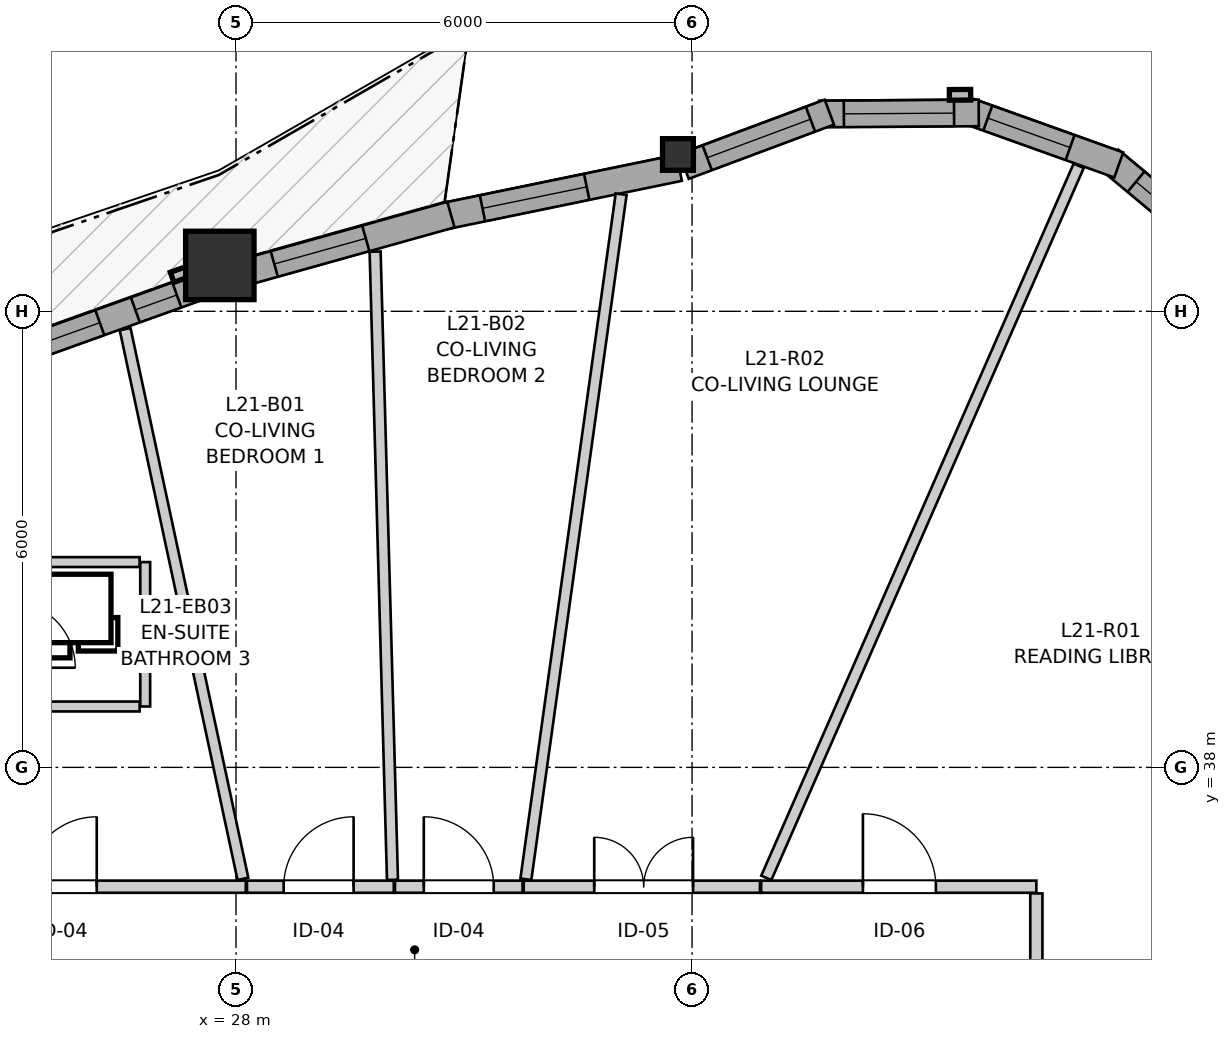
"""IFC4 building model, lengths in metres.
Left out: names, types, materials, properties, quantities, classifications, styles, units other than length and angle.
Written with IfcOpenShell. Run it as: python <this file> out.ifc"""

import sys

from ifc_helpers import new_model, si_unit, direction, frame, frame_2d, origin, origin_2d, place, context, subcontext, project, spatial, rectangle, i_section, extrude, source, transform, mapped, element, fill, save


model = new_model("IFC4")
c1 = context("Model", 3, precision=1e-05, world=origin(), true_north=direction((0.0, 1.0)))
c2 = subcontext(c1, "Body", "Model", "MODEL_VIEW")
j1 = project(units=[si_unit("LENGTHUNIT", "METRE"), si_unit("PLANEANGLEUNIT", "RADIAN")], contexts=[c1])
p1 = place(None, origin())
s1 = spatial("IfcSite", under=j1, at=p1, CompositionType="ELEMENT")
p2 = place(p1, origin())
s2 = spatial("IfcBuilding", under=s1, at=p2, CompositionType="ELEMENT")
p3 = place(p2, frame((0.0, 0.0, 73.6)))
s3 = spatial("IfcBuildingStorey", under=s2, at=p3, CompositionType="ELEMENT", Elevation=73.6)
m1 = source(origin(), c2, "Body", "SweptSolid", [
    extrude(i_section(OverallWidth=0.406, OverallDepth=0.416, WebThickness=0.027, FlangeThickness=0.044, FilletRadius=0.015, at=origin_2d()), origin(), (0.0, 0.0, 1.0), 2.95),
])
p4 = place(p3, frame((33.815, 46.063, 0.0), z_axis=(0.0, 0.0, 1.0), x_axis=(1.0, 0.0, 0.0)))
e1 = element("IfcColumn", 1, at=p4, inside=s3, PredefinedType="PILASTER", context=c2, shape_type="MappedRepresentation", body=[
    mapped(m1, transform((0.0, 0.0, 0.0), x_axis=(1.0, 0.0, 0.0), y_axis=(0.0, 1.0, 0.0), z_axis=(0.0, 0.0, 1.0), scale=1.0)),
])
m2 = source(origin(), c2, "Body", "SweptSolid", [
    extrude(rectangle(XDim=0.9, YDim=0.9, at=origin_2d()), origin(), (0.0, 0.0, 1.0), 2.95),
])
p5 = place(p3, frame((27.787, 44.604, 0.0), z_axis=(0.0, 0.0, 1.0), x_axis=(1.0, 0.0, 0.0)))
e2 = element("IfcColumn", 2, at=p5, inside=s3, PredefinedType="COLUMN", context=c2, shape_type="MappedRepresentation", body=[
    mapped(m2, transform((0.0, 0.0, 0.0), x_axis=(1.0, 0.0, 0.0), y_axis=(0.0, 1.0, 0.0), z_axis=(0.0, 0.0, 1.0), scale=1.0)),
])
p6 = place(p3, frame((41.109, 44.65, 0.0), z_axis=(0.0, 0.0, 1.0), x_axis=(-0.768450068703, 0.639909752942, 0.0)))
e3 = element("IfcWall", 3, at=p6, inside=s3, PredefinedType="SOLIDWALL", context=c2, shape_type="SweptSolid", body=[
    extrude(rectangle(XDim=2.099, YDim=0.35, at=frame_2d((1.049, 0.0))), origin(), (0.0, 0.0, 1.0), 2.48),
])
p7 = place(p6, frame((0.449, 0.0, 0.82)))
e4 = element("IfcOpeningElement", 4, at=p7, cuts=e3, PredefinedType="OPENING", context=c2, shape_type="SweptSolid", body=[
    extrude(rectangle(XDim=1.2, YDim=1.45, at=frame_2d((0.6, 0.725))), frame((0.0, 0.185, 0.0), z_axis=(0.0, -1.0, 0.0), x_axis=(1.0, 0.0, 0.0)), (0.0, 0.0, 1.0), 0.37),
])
p8 = place(p3, frame((39.614, 45.925, 0.0), z_axis=(0.0, 0.0, 1.0), x_axis=(-0.941486401639, 0.33705096874, 0.0)))
e5 = element("IfcWall", 5, at=p8, inside=s3, PredefinedType="SOLIDWALL", context=c2, shape_type="SweptSolid", body=[
    extrude(rectangle(XDim=2.099, YDim=0.35, at=frame_2d((1.05, 0.0))), origin(), (0.0, 0.0, 1.0), 2.48),
])
p9 = place(p8, frame((0.68, 0.0, 0.82)))
e6 = element("IfcOpeningElement", 6, at=p9, cuts=e5, PredefinedType="OPENING", context=c2, shape_type="SweptSolid", body=[
    extrude(rectangle(XDim=1.15, YDim=1.2, at=frame_2d((0.575, 0.6))), frame((0.0, 0.185, 0.0), z_axis=(0.0, -1.0, 0.0), x_axis=(1.0, 0.0, 0.0)), (0.0, 0.0, 1.0), 0.37),
])
p10 = place(p3, frame((37.772, 46.61, 0.0), z_axis=(0.0, 0.0, 1.0), x_axis=(-0.999976451414, -0.006862697526, 0.0)))
e7 = element("IfcWall", 7, at=p10, inside=s3, PredefinedType="SOLIDWALL", context=c2, shape_type="SweptSolid", body=[
    extrude(rectangle(XDim=2.099, YDim=0.35, at=frame_2d((1.049, 0.0))), origin(), (0.0, 0.0, 1.0), 2.48),
])
p11 = place(p10, frame((0.324, 0.0, 0.82)))
e8 = element("IfcOpeningElement", 8, at=p11, cuts=e7, PredefinedType="OPENING", context=c2, shape_type="SweptSolid", body=[
    extrude(rectangle(XDim=1.45, YDim=1.25, at=frame_2d((0.725, 0.625))), frame((0.0, 0.185, 0.0), z_axis=(0.0, -1.0, 0.0), x_axis=(1.0, 0.0, 0.0)), (0.0, 0.0, 1.0), 0.37),
])
p12 = place(p3, frame((35.806, 46.62, 0.0), z_axis=(0.0, 0.0, 1.0), x_axis=(-0.936863987578, -0.34969396446, 0.0)))
e9 = element("IfcWall", 9, at=p12, inside=s3, PredefinedType="SOLIDWALL", context=c2, shape_type="SweptSolid", body=[
    extrude(rectangle(XDim=2.041, YDim=0.35, at=frame_2d((1.021, 0.0))), origin(), (0.0, 0.0, 1.0), 2.48),
])
p13 = place(p12, frame((0.265, 0.0, 0.82)))
e10 = element("IfcOpeningElement", 10, at=p13, cuts=e9, PredefinedType="OPENING", context=c2, shape_type="SweptSolid", body=[
    extrude(rectangle(XDim=1.45, YDim=1.25, at=frame_2d((0.725, 0.625))), frame((0.0, 0.185, 0.0), z_axis=(0.0, -1.0, 0.0), x_axis=(1.0, 0.0, 0.0)), (0.0, 0.0, 1.0), 0.37),
])
p14 = place(p3, frame((33.83, 45.888, 0.0), z_axis=(0.0, 0.0, 1.0), x_axis=(-0.979439051097, -0.201740291429, 0.0)))
e11 = element("IfcWall", 11, at=p14, inside=s3, PredefinedType="SOLIDWALL", context=c2, shape_type="SweptSolid", body=[
    extrude(rectangle(XDim=3.154, YDim=0.35, at=frame_2d((1.577, 0.0))), origin(), (0.0, 0.0, 1.0), 2.48),
])
p15 = place(p14, frame((1.242, 0.0, 0.82)))
e12 = element("IfcOpeningElement", 12, at=p15, cuts=e11, PredefinedType="OPENING", context=c2, shape_type="SweptSolid", body=[
    extrude(rectangle(XDim=1.4, YDim=1.35, at=frame_2d((0.7, 0.675))), frame((0.0, 0.185, 0.0), z_axis=(0.0, -1.0, 0.0), x_axis=(1.0, 0.0, 0.0)), (0.0, 0.0, 1.0), 0.37),
])
p16 = place(p3, frame((30.827, 45.272, 0.0), z_axis=(0.0, 0.0, 1.0), x_axis=(-0.963061576901, -0.269281263918, 0.0)))
e13 = element("IfcWall", 13, at=p16, inside=s3, PredefinedType="SOLIDWALL", context=c2, shape_type="SweptSolid", body=[
    extrude(rectangle(XDim=2.883, YDim=0.35, at=frame_2d((1.441, 0.0))), origin(), (0.0, 0.0, 1.0), 2.48),
])
p17 = place(p16, frame((1.163, 0.0, 0.82)))
e14 = element("IfcOpeningElement", 14, at=p17, cuts=e13, PredefinedType="OPENING", context=c2, shape_type="SweptSolid", body=[
    extrude(rectangle(XDim=1.25, YDim=1.35, at=frame_2d((0.625, 0.675))), frame((0.0, 0.185, 0.0), z_axis=(0.0, -1.0, 0.0), x_axis=(1.0, 0.0, 0.0)), (0.0, 0.0, 1.0), 0.37),
])
p18 = place(p3, frame((27.634, 44.363, 0.0), z_axis=(0.0, 0.0, 1.0), x_axis=(-0.941122275829, -0.3380663573, 0.0)))
e15 = element("IfcWall", 15, at=p18, inside=s3, PredefinedType="SOLIDWALL", context=c2, shape_type="SweptSolid", body=[
    extrude(rectangle(XDim=2.833, YDim=0.35, at=frame_2d((1.417, 0.0))), origin(), (0.0, 0.0, 1.0), 2.48),
])
p19 = place(p18, frame((0.439, 0.0, 0.82)))
e16 = element("IfcOpeningElement", 16, at=p19, cuts=e15, PredefinedType="OPENING", context=c2, shape_type="SweptSolid", body=[
    extrude(rectangle(XDim=0.58, YDim=1.35, at=frame_2d((0.29, 0.675))), frame((0.0, 0.185, 0.0), z_axis=(0.0, -1.0, 0.0), x_axis=(1.0, 0.0, 0.0)), (0.0, 0.0, 1.0), 0.37),
])
p20 = place(p18, frame((1.515, 0.0, 0.82)))
e17 = element("IfcOpeningElement", 17, at=p20, cuts=e15, PredefinedType="OPENING", context=c2, shape_type="SweptSolid", body=[
    extrude(rectangle(XDim=0.95, YDim=1.35, at=frame_2d((0.475, 0.675))), frame((0.0, 0.185, 0.0), z_axis=(0.0, -1.0, 0.0), x_axis=(1.0, 0.0, 0.0)), (0.0, 0.0, 1.0), 0.37),
])
p21 = place(p3, frame((23.284, 36.43, 0.0), z_axis=(0.0, 0.0, 1.0), x_axis=(1.0, 0.0, 0.0)))
e18 = element("IfcWall", 18, at=p21, inside=s3, PredefinedType="PARTITIONING", context=c2, shape_type="SweptSolid", body=[
    extrude(rectangle(XDim=4.845, YDim=0.16, at=frame_2d((2.422, 0.0))), origin(), (0.0, 0.0, 1.0), 2.588),
])
p22 = place(p21, frame((1.963, 0.0, 0.0)))
e19 = element("IfcOpeningElement", 19, at=p22, cuts=e18, PredefinedType="OPENING", context=c2, shape_type="SweptSolid", body=[
    extrude(rectangle(XDim=0.92, YDim=2.1, at=frame_2d((0.46, 1.05))), frame((0.0, 0.09, 0.0), z_axis=(0.0, -1.0, 0.0), x_axis=(1.0, 0.0, 0.0)), (0.0, 0.0, 1.0), 0.18),
])
p23 = place(p3, frame((34.909, 36.43, 0.0), z_axis=(0.0, 0.0, 1.0), x_axis=(1.0, 0.0, 0.0)))
e20 = element("IfcWall", 20, at=p23, inside=s3, PredefinedType="PARTITIONING", context=c2, shape_type="SweptSolid", body=[
    extrude(rectangle(XDim=3.621, YDim=0.16, at=frame_2d((1.811, 0.0))), origin(), (0.0, 0.0, 1.0), 2.588),
])
p24 = place(p23, frame((1.339, 0.0, 0.0)))
e21 = element("IfcOpeningElement", 21, at=p24, cuts=e20, PredefinedType="OPENING", context=c2, shape_type="SweptSolid", body=[
    extrude(rectangle(XDim=0.96, YDim=2.1, at=frame_2d((0.48, 1.05))), frame((0.0, 0.09, 0.0), z_axis=(0.0, -1.0, 0.0), x_axis=(1.0, 0.0, 0.0)), (0.0, 0.0, 1.0), 0.18),
])
p25 = place(p3, frame((31.785, 36.43, 0.0), z_axis=(0.0, 0.0, 1.0), x_axis=(1.0, 0.0, 0.0)))
e22 = element("IfcWall", 22, at=p25, inside=s3, PredefinedType="PARTITIONING", context=c2, shape_type="SweptSolid", body=[
    extrude(rectangle(XDim=3.109, YDim=0.16, at=frame_2d((1.555, 0.0))), origin(), (0.0, 0.0, 1.0), 2.95),
])
p26 = place(p25, frame((0.928, 0.0, 0.0)))
e23 = element("IfcOpeningElement", 23, at=p26, cuts=e22, PredefinedType="OPENING", context=c2, shape_type="SweptSolid", body=[
    extrude(rectangle(XDim=1.3, YDim=2.1, at=frame_2d((0.65, 1.05))), frame((0.0, 0.09, 0.0), z_axis=(0.0, -1.0, 0.0), x_axis=(1.0, 0.0, 0.0)), (0.0, 0.0, 1.0), 0.18),
])
p27 = place(p3, frame((28.144, 36.43, 0.0), z_axis=(0.0, 0.0, 1.0), x_axis=(1.0, 0.0, 0.0)))
e24 = element("IfcWall", 24, at=p27, inside=s3, PredefinedType="PARTITIONING", context=c2, shape_type="SweptSolid", body=[
    extrude(rectangle(XDim=1.932, YDim=0.16, at=frame_2d((0.966, 0.0))), origin(), (0.0, 0.0, 1.0), 2.95),
])
p28 = place(p27, frame((0.483, 0.0, 0.0)))
e25 = element("IfcOpeningElement", 25, at=p28, cuts=e24, PredefinedType="OPENING", context=c2, shape_type="SweptSolid", body=[
    extrude(rectangle(XDim=0.92, YDim=2.1, at=frame_2d((0.46, 1.05))), frame((0.0, 0.09, 0.0), z_axis=(0.0, -1.0, 0.0), x_axis=(1.0, 0.0, 0.0)), (0.0, 0.0, 1.0), 0.18),
])
p29 = place(p3, frame((30.091, 36.43, 0.0), z_axis=(0.0, 0.0, 1.0), x_axis=(1.0, 0.0, 0.0)))
e26 = element("IfcWall", 26, at=p29, inside=s3, PredefinedType="PARTITIONING", context=c2, shape_type="SweptSolid", body=[
    extrude(rectangle(XDim=1.679, YDim=0.16, at=frame_2d((0.839, 0.0))), origin(), (0.0, 0.0, 1.0), 2.95),
])
p30 = place(p29, frame((0.379, 0.0, 0.0)))
e27 = element("IfcOpeningElement", 27, at=p30, cuts=e26, PredefinedType="OPENING", context=c2, shape_type="SweptSolid", body=[
    extrude(rectangle(XDim=0.92, YDim=2.1, at=frame_2d((0.46, 1.05))), frame((0.0, 0.09, 0.0), z_axis=(0.0, -1.0, 0.0), x_axis=(1.0, 0.0, 0.0)), (0.0, 0.0, 1.0), 0.18),
])
p31 = place(p3, frame((34.977, 36.546, 0.0), z_axis=(0.0, 0.0, 1.0), x_axis=(0.40175384449, 0.915747699117, 0.0)))
e28 = element("IfcWall", 28, at=p31, inside=s3, PredefinedType="PARTITIONING", context=c2, shape_type="SweptSolid", body=[
    extrude(rectangle(XDim=10.23, YDim=0.145, at=frame_2d((5.115, 0.0))), origin(), (0.0, 0.0, 1.0), 2.95),
])
p32 = place(p3, frame((31.814, 36.528, 0.0), z_axis=(0.0, 0.0, 1.0), x_axis=(0.137724115974, 0.990470629488, 0.0)))
e29 = element("IfcWall", 29, at=p32, inside=s3, PredefinedType="PARTITIONING", context=c2, shape_type="SweptSolid", body=[
    extrude(rectangle(XDim=9.099, YDim=0.145, at=frame_2d((4.55, 0.0))), origin(), (0.0, 0.0, 1.0), 2.95),
])
p33 = place(p3, frame((29.83, 44.785, 0.0), z_axis=(0.0, 0.0, 1.0), x_axis=(0.027636759054, -0.999618031825, 0.0)))
e30 = element("IfcWall", 30, at=p33, inside=s3, PredefinedType="PARTITIONING", context=c2, shape_type="SweptSolid", body=[
    extrude(rectangle(XDim=8.269, YDim=0.145, at=frame_2d((4.134, 0.0))), origin(), (0.0, 0.0, 1.0), 2.95),
])
p34 = place(p3, frame((26.541, 43.766, 0.0), z_axis=(0.0, 0.0, 1.0), x_axis=(0.209522326513, -0.9778038631, 0.0)))
e31 = element("IfcWall", 31, at=p34, inside=s3, PredefinedType="PARTITIONING", context=c2, shape_type="SweptSolid", body=[
    extrude(rectangle(XDim=7.397, YDim=0.145, at=frame_2d((3.698, 0.0))), origin(), (0.0, 0.0, 1.0), 2.95),
])
p35 = place(p3, frame((38.665, 33.63, 0.0), z_axis=(0.0, 0.0, 1.0), x_axis=(0.736824900837, 0.676083623161, 0.0)))
e32 = element("IfcWall", 32, at=p35, inside=s3, PredefinedType="PARTITIONING", context=c2, shape_type="SweptSolid", body=[
    extrude(rectangle(XDim=6.25, YDim=0.145, at=frame_2d((3.125, 0.0))), origin(), (0.0, 0.0, 1.0), 2.95),
])
p36 = place(p3, frame((38.53, 33.721, 0.0), z_axis=(0.0, 0.0, 1.0), x_axis=(0.0, 1.0, 0.0)))
e33 = element("IfcWall", 33, at=p36, inside=s3, PredefinedType="PARTITIONING", context=c2, shape_type="SweptSolid", body=[
    extrude(rectangle(XDim=2.621, YDim=0.16, at=frame_2d((1.311, 0.0))), origin(), (0.0, 0.0, 1.0), 2.588),
])
p37 = place(p3, frame((26.805, 38.801, 0.0), z_axis=(0.0, 0.0, 1.0), x_axis=(0.0, 1.0, 0.0)))
e34 = element("IfcWall", 34, at=p37, inside=s3, PredefinedType="PARTITIONING", context=c2, shape_type="SweptSolid", body=[
    extrude(rectangle(XDim=1.9, YDim=0.13, at=frame_2d((0.95, 0.0))), origin(), (0.0, 0.0, 1.0), 2.95),
])
p38 = place(p3, frame((25.078, 40.701, 0.0), z_axis=(0.0, 0.0, 1.0), x_axis=(1.0, 0.0, 0.0)))
e35 = element("IfcWall", 35, at=p38, inside=s3, PredefinedType="PARTITIONING", context=c2, shape_type="SweptSolid", body=[
    extrude(rectangle(XDim=1.654, YDim=0.13, at=frame_2d((0.827, 0.0))), origin(), (0.0, 0.0, 1.0), 2.558),
])
p39 = place(p3, frame((25.078, 38.801, 0.0), z_axis=(0.0, 0.0, 1.0), x_axis=(1.0, 0.0, 0.0)))
e36 = element("IfcWall", 36, at=p39, inside=s3, PredefinedType="PARTITIONING", context=c2, shape_type="SweptSolid", body=[
    extrude(rectangle(XDim=1.654, YDim=0.13, at=frame_2d((0.827, 0.0))), origin(), (0.0, 0.0, 1.0), 2.95),
])
m3 = source(origin(), c2, "Body", "SweptSolid", [
    extrude(rectangle(XDim=1.2, YDim=1.45, at=frame_2d((0.6, 0.725))), frame((0.0, 0.03, 0.0), z_axis=(0.0, -1.0, 0.0), x_axis=(1.0, 0.0, 0.0)), (0.0, 0.0, 1.0), 0.06),
])
p40 = place(p7, origin())
e37 = element("IfcWindow", 37, at=p40, inside=s3, PartitioningType="SINGLE_PANEL", PredefinedType="WINDOW", context=c2, shape_type="MappedRepresentation", body=[
    mapped(m3, transform((0.0, 0.0, 0.0), x_axis=(1.0, 0.0, 0.0), y_axis=(0.0, 1.0, 0.0), z_axis=(0.0, 0.0, 1.0), scale=1.0)),
])
fill(e4, e37)
m4 = source(origin(), c2, "Body", "SweptSolid", [
    extrude(rectangle(XDim=1.15, YDim=1.2, at=frame_2d((0.575, 0.6))), frame((0.0, 0.03, 0.0), z_axis=(0.0, -1.0, 0.0), x_axis=(1.0, 0.0, 0.0)), (0.0, 0.0, 1.0), 0.06),
])
p41 = place(p9, origin())
e38 = element("IfcWindow", 38, at=p41, inside=s3, PartitioningType="SINGLE_PANEL", PredefinedType="WINDOW", context=c2, shape_type="MappedRepresentation", body=[
    mapped(m4, transform((0.0, 0.0, 0.0), x_axis=(1.0, 0.0, 0.0), y_axis=(0.0, 1.0, 0.0), z_axis=(0.0, 0.0, 1.0), scale=1.0)),
])
fill(e6, e38)
m5 = source(origin(), c2, "Body", "SweptSolid", [
    extrude(rectangle(XDim=1.45, YDim=1.25, at=frame_2d((0.725, 0.625))), frame((0.0, 0.03, 0.0), z_axis=(0.0, -1.0, 0.0), x_axis=(1.0, 0.0, 0.0)), (0.0, 0.0, 1.0), 0.06),
])
p42 = place(p11, origin())
e39 = element("IfcWindow", 39, at=p42, inside=s3, PartitioningType="SINGLE_PANEL", PredefinedType="WINDOW", context=c2, shape_type="MappedRepresentation", body=[
    mapped(m5, transform((0.0, 0.0, 0.0), x_axis=(1.0, 0.0, 0.0), y_axis=(0.0, 1.0, 0.0), z_axis=(0.0, 0.0, 1.0), scale=1.0)),
])
fill(e8, e39)
p43 = place(p13, origin())
e40 = element("IfcWindow", 40, at=p43, inside=s3, PartitioningType="SINGLE_PANEL", PredefinedType="WINDOW", context=c2, shape_type="MappedRepresentation", body=[
    mapped(m5, transform((0.0, 0.0, 0.0), x_axis=(1.0, 0.0, 0.0), y_axis=(0.0, 1.0, 0.0), z_axis=(0.0, 0.0, 1.0), scale=1.0)),
])
fill(e10, e40)
m6 = source(origin(), c2, "Body", "SweptSolid", [
    extrude(rectangle(XDim=1.4, YDim=1.35, at=frame_2d((0.7, 0.675))), frame((0.0, 0.03, 0.0), z_axis=(0.0, -1.0, 0.0), x_axis=(1.0, 0.0, 0.0)), (0.0, 0.0, 1.0), 0.06),
])
p44 = place(p15, origin())
e41 = element("IfcWindow", 41, at=p44, inside=s3, PartitioningType="SINGLE_PANEL", PredefinedType="WINDOW", context=c2, shape_type="MappedRepresentation", body=[
    mapped(m6, transform((0.0, 0.0, 0.0), x_axis=(1.0, 0.0, 0.0), y_axis=(0.0, 1.0, 0.0), z_axis=(0.0, 0.0, 1.0), scale=1.0)),
])
fill(e12, e41)
m7 = source(origin(), c2, "Body", "SweptSolid", [
    extrude(rectangle(XDim=1.25, YDim=1.35, at=frame_2d((0.625, 0.675))), frame((0.0, 0.03, 0.0), z_axis=(0.0, -1.0, 0.0), x_axis=(1.0, 0.0, 0.0)), (0.0, 0.0, 1.0), 0.06),
])
p45 = place(p17, origin())
e42 = element("IfcWindow", 42, at=p45, inside=s3, PartitioningType="SINGLE_PANEL", PredefinedType="WINDOW", context=c2, shape_type="MappedRepresentation", body=[
    mapped(m7, transform((0.0, 0.0, 0.0), x_axis=(1.0, 0.0, 0.0), y_axis=(0.0, 1.0, 0.0), z_axis=(0.0, 0.0, 1.0), scale=1.0)),
])
fill(e14, e42)
m8 = source(origin(), c2, "Body", "SweptSolid", [
    extrude(rectangle(XDim=0.58, YDim=1.35, at=frame_2d((0.29, 0.675))), frame((0.0, 0.03, 0.0), z_axis=(0.0, -1.0, 0.0), x_axis=(1.0, 0.0, 0.0)), (0.0, 0.0, 1.0), 0.06),
])
p46 = place(p19, origin())
e43 = element("IfcWindow", 43, at=p46, inside=s3, PartitioningType="SINGLE_PANEL", PredefinedType="WINDOW", context=c2, shape_type="MappedRepresentation", body=[
    mapped(m8, transform((0.0, 0.0, 0.0), x_axis=(1.0, 0.0, 0.0), y_axis=(0.0, 1.0, 0.0), z_axis=(0.0, 0.0, 1.0), scale=1.0)),
])
fill(e16, e43)
m9 = source(origin(), c2, "Body", "SweptSolid", [
    extrude(rectangle(XDim=0.95, YDim=1.35, at=frame_2d((0.475, 0.675))), frame((0.0, 0.03, 0.0), z_axis=(0.0, -1.0, 0.0), x_axis=(1.0, 0.0, 0.0)), (0.0, 0.0, 1.0), 0.06),
])
p47 = place(p20, origin())
e44 = element("IfcWindow", 44, at=p47, inside=s3, PartitioningType="SINGLE_PANEL", PredefinedType="WINDOW", context=c2, shape_type="MappedRepresentation", body=[
    mapped(m9, transform((0.0, 0.0, 0.0), x_axis=(1.0, 0.0, 0.0), y_axis=(0.0, 1.0, 0.0), z_axis=(0.0, 0.0, 1.0), scale=1.0)),
])
fill(e17, e44)
m10 = source(origin(), c2, "Body", "SweptSolid", [
    extrude(rectangle(XDim=0.92, YDim=2.1, at=frame_2d((0.46, 1.05))), frame((0.0, 0.025, 0.0), z_axis=(0.0, -1.0, 0.0), x_axis=(1.0, 0.0, 0.0)), (0.0, 0.0, 1.0), 0.05),
])
p48 = place(p22, origin())
e45 = element("IfcDoor", 45, at=p48, inside=s3, OperationType="SINGLE_SWING_RIGHT", PredefinedType="DOOR", context=c2, shape_type="MappedRepresentation", body=[
    mapped(m10, transform((0.0, 0.0, 0.0), x_axis=(1.0, 0.0, 0.0), y_axis=(0.0, 1.0, 0.0), z_axis=(0.0, 0.0, 1.0), scale=1.0)),
])
fill(e19, e45)
m11 = source(origin(), c2, "Body", "SweptSolid", [
    extrude(rectangle(XDim=0.96, YDim=2.1, at=frame_2d((0.48, 1.05))), frame((0.0, 0.025, 0.0), z_axis=(0.0, -1.0, 0.0), x_axis=(1.0, 0.0, 0.0)), (0.0, 0.0, 1.0), 0.05),
])
p49 = place(p24, origin())
e46 = element("IfcDoor", 46, at=p49, inside=s3, OperationType="SINGLE_SWING_LEFT", PredefinedType="DOOR", context=c2, shape_type="MappedRepresentation", body=[
    mapped(m11, transform((0.0, 0.0, 0.0), x_axis=(1.0, 0.0, 0.0), y_axis=(0.0, 1.0, 0.0), z_axis=(0.0, 0.0, 1.0), scale=1.0)),
])
fill(e21, e46)
m12 = source(origin(), c2, "Body", "SweptSolid", [
    extrude(rectangle(XDim=1.3, YDim=2.1, at=frame_2d((0.65, 1.05))), frame((0.0, 0.025, 0.0), z_axis=(0.0, -1.0, 0.0), x_axis=(1.0, 0.0, 0.0)), (0.0, 0.0, 1.0), 0.05),
])
p50 = place(p26, origin())
e47 = element("IfcDoor", 47, at=p50, inside=s3, OperationType="DOUBLE_DOOR_SINGLE_SWING", PredefinedType="DOOR", context=c2, shape_type="MappedRepresentation", body=[
    mapped(m12, transform((0.0, 0.0, 0.0), x_axis=(1.0, 0.0, 0.0), y_axis=(0.0, 1.0, 0.0), z_axis=(0.0, 0.0, 1.0), scale=1.0)),
])
fill(e23, e47)
p51 = place(p28, origin())
e48 = element("IfcDoor", 48, at=p51, inside=s3, OperationType="SINGLE_SWING_RIGHT", PredefinedType="DOOR", context=c2, shape_type="MappedRepresentation", body=[
    mapped(m10, transform((0.0, 0.0, 0.0), x_axis=(1.0, 0.0, 0.0), y_axis=(0.0, 1.0, 0.0), z_axis=(0.0, 0.0, 1.0), scale=1.0)),
])
fill(e25, e48)
p52 = place(p30, origin())
e49 = element("IfcDoor", 49, at=p52, inside=s3, OperationType="SINGLE_SWING_LEFT", PredefinedType="DOOR", context=c2, shape_type="MappedRepresentation", body=[
    mapped(m10, transform((0.0, 0.0, 0.0), x_axis=(1.0, 0.0, 0.0), y_axis=(0.0, 1.0, 0.0), z_axis=(0.0, 0.0, 1.0), scale=1.0)),
])
fill(e27, e49)
save(model, sys.argv[1])
